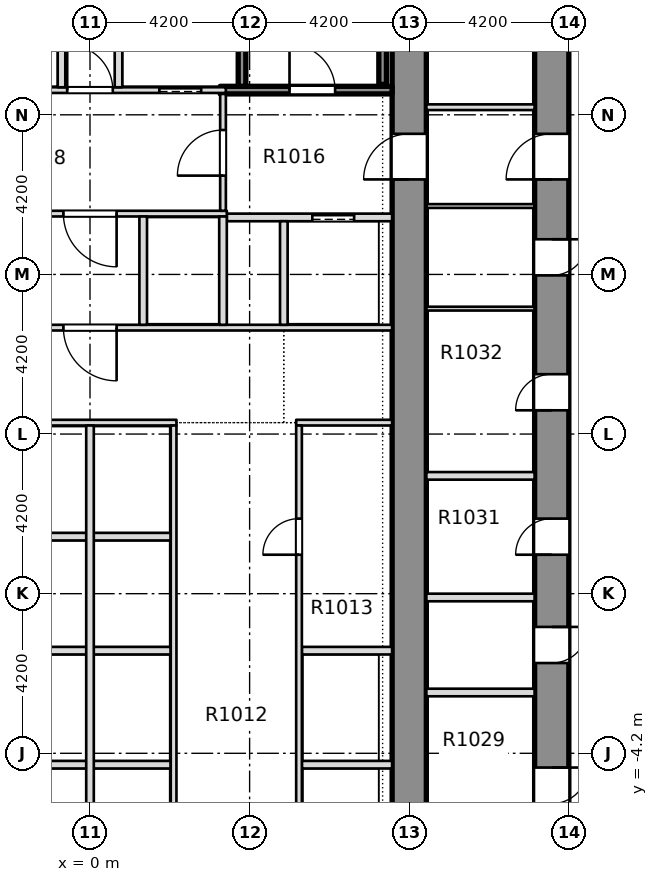
"""IFC4 building model, lengths in metres.
Left out: names, types, materials, properties, quantities, classifications, styles, units other than length and angle.
Written with IfcOpenShell. Run it as: python <this file> out.ifc"""

import sys

from ifc_helpers import new_model, si_unit, direction, frame, frame_2d, origin, place, context, subcontext, project, spatial, rectangle, extrude, element, fill, save


model = new_model("IFC4")
c1 = context("Model", 3, precision=1e-05, world=origin(), true_north=direction((0.0, 1.0)))
c2 = subcontext(c1, "Body", "Model", "MODEL_VIEW")
j1 = project(units=[si_unit("LENGTHUNIT", "METRE"), si_unit("PLANEANGLEUNIT", "RADIAN")], contexts=[c1])
p1 = place(None, origin())
s1 = spatial("IfcSite", under=j1, at=p1, CompositionType="ELEMENT")
p2 = place(p1, origin())
s2 = spatial("IfcBuilding", under=s1, at=p2, CompositionType="ELEMENT")
p3 = place(p2, frame((0.0, 0.0, 48.3)))
s3 = spatial("IfcBuildingStorey", under=s2, at=p3, CompositionType="ELEMENT", Elevation=48.3)
p4 = place(p3, frame((12.15, -8.4, -0.32), z_axis=(0.0, 0.0, 1.0), x_axis=(0.0, 1.0, 0.0)))
e1 = element("IfcWall", 1, at=p4, inside=s3, PredefinedType="SHEAR", context=c2, shape_type="SweptSolid", body=[
    extrude(rectangle(XDim=30.15, YDim=0.9, at=frame_2d((15.075, 0.0))), origin(), (0.0, 0.0, 1.0), 3.45),
])
p5 = place(p4, frame((2.875, 0.0, 0.32)))
e2 = element("IfcOpeningElement", 2, at=p5, cuts=e1, PredefinedType="OPENING", context=c2, shape_type="SweptSolid", body=[
    extrude(rectangle(XDim=0.95, YDim=2.1, at=frame_2d((0.475, 1.05))), frame((0.0, 0.46, 0.0), z_axis=(0.0, -1.0, 0.0), x_axis=(1.0, 0.0, 0.0)), (0.0, 0.0, 1.0), 0.92),
])
p6 = place(p4, frame((6.575, 0.0, 0.32)))
e3 = element("IfcOpeningElement", 3, at=p6, cuts=e1, PredefinedType="OPENING", context=c2, shape_type="SweptSolid", body=[
    extrude(rectangle(XDim=0.95, YDim=2.1, at=frame_2d((0.475, 1.05))), frame((0.0, 0.46, 0.0), z_axis=(0.0, -1.0, 0.0), x_axis=(1.0, 0.0, 0.0)), (0.0, 0.0, 1.0), 0.92),
])
p7 = place(p4, frame((9.425, 0.0, 0.32)))
e4 = element("IfcOpeningElement", 4, at=p7, cuts=e1, PredefinedType="OPENING", context=c2, shape_type="SweptSolid", body=[
    extrude(rectangle(XDim=0.95, YDim=2.1, at=frame_2d((0.475, 1.05))), frame((0.0, 0.46, 0.0), z_axis=(0.0, -1.0, 0.0), x_axis=(1.0, 0.0, 0.0)), (0.0, 0.0, 1.0), 0.92),
])
p8 = place(p4, frame((13.225, 0.0, 0.32)))
e5 = element("IfcOpeningElement", 5, at=p8, cuts=e1, PredefinedType="OPENING", context=c2, shape_type="SweptSolid", body=[
    extrude(rectangle(XDim=0.95, YDim=2.1, at=frame_2d((0.475, 1.05))), frame((0.0, 0.46, 0.0), z_axis=(0.0, -1.0, 0.0), x_axis=(1.0, 0.0, 0.0)), (0.0, 0.0, 1.0), 0.92),
])
p9 = place(p4, frame((16.775, 0.0, 0.32)))
e6 = element("IfcOpeningElement", 6, at=p9, cuts=e1, PredefinedType="OPENING", context=c2, shape_type="SweptSolid", body=[
    extrude(rectangle(XDim=0.95, YDim=2.1, at=frame_2d((0.475, 1.05))), frame((0.0, 0.46, 0.0), z_axis=(0.0, -1.0, 0.0), x_axis=(1.0, 0.0, 0.0)), (0.0, 0.0, 1.0), 0.92),
])
p10 = place(p4, frame((24.75, 0.0, 0.32)))
e7 = element("IfcOpeningElement", 7, at=p10, cuts=e1, PredefinedType="OPENING", context=c2, shape_type="SweptSolid", body=[
    extrude(rectangle(XDim=0.95, YDim=2.1, at=frame_2d((0.475, 1.05))), frame((0.0, 0.46, 0.0), z_axis=(0.0, -1.0, 0.0), x_axis=(1.0, 0.0, 0.0)), (0.0, 0.0, 1.0), 0.92),
])
p11 = place(p4, frame((19.3, 0.0, 0.32)))
e8 = element("IfcOpeningElement", 8, at=p11, cuts=e1, PredefinedType="OPENING", context=c2, shape_type="SweptSolid", body=[
    extrude(rectangle(XDim=1.2, YDim=2.1, at=frame_2d((0.6, 1.05))), frame((0.0, 0.46, 0.0), z_axis=(0.0, -1.0, 0.0), x_axis=(1.0, 0.0, 0.0)), (0.0, 0.0, 1.0), 0.92),
])
p12 = place(p3, frame((8.4, -7.5, -0.32), z_axis=(0.0, 0.0, 1.0), x_axis=(0.0, 1.0, 0.0)))
e9 = element("IfcWall", 9, at=p12, inside=s3, PredefinedType="SHEAR", context=c2, shape_type="SweptSolid", body=[
    extrude(rectangle(XDim=28.35, YDim=0.9, at=frame_2d((14.175, 0.0))), origin(), (0.0, 0.0, 1.0), 3.45),
])
p13 = place(p12, frame((18.4, 0.0, 0.32)))
e10 = element("IfcOpeningElement", 10, at=p13, cuts=e9, PredefinedType="OPENING", context=c2, shape_type="SweptSolid", body=[
    extrude(rectangle(XDim=1.2, YDim=2.1, at=frame_2d((0.6, 1.05))), frame((0.0, 0.46, 0.0), z_axis=(0.0, -1.0, 0.0), x_axis=(1.0, 0.0, 0.0)), (0.0, 0.0, 1.0), 0.92),
])
p14 = place(p3, frame((-2.125, -4.5, 0.0), z_axis=(0.0, 0.0, 1.0), x_axis=(1.0, 0.0, 0.0)))
e11 = element("IfcWall", 11, at=p14, inside=s3, PredefinedType="PARTITIONING", context=c2, shape_type="SweptSolid", body=[
    extrude(rectangle(XDim=4.25, YDim=0.2, at=frame_2d((2.125, 0.0))), origin(), (0.0, 0.0, 1.0), 3.13),
])
p15 = place(p3, frame((5.575, -4.5, 0.0), z_axis=(0.0, 0.0, 1.0), x_axis=(1.0, 0.0, 0.0)))
e12 = element("IfcWall", 12, at=p15, inside=s3, PredefinedType="PARTITIONING", context=c2, shape_type="SweptSolid", body=[
    extrude(rectangle(XDim=2.374, YDim=0.2, at=frame_2d((1.187, 0.0))), origin(), (0.0, 0.0, 1.0), 3.13),
])
p16 = place(p3, frame((-2.125, -1.5, 0.0), z_axis=(0.0, 0.0, 1.0), x_axis=(1.0, 0.0, 0.0)))
e13 = element("IfcWall", 13, at=p16, inside=s3, PredefinedType="PARTITIONING", context=c2, shape_type="SweptSolid", body=[
    extrude(rectangle(XDim=4.25, YDim=0.2, at=frame_2d((2.125, 0.0))), origin(), (0.0, 0.0, 1.0), 3.13),
])
p17 = place(p3, frame((5.575, -1.5, 0.0), z_axis=(0.0, 0.0, 1.0), x_axis=(1.0, 0.0, 0.0)))
e14 = element("IfcWall", 14, at=p17, inside=s3, PredefinedType="PARTITIONING", context=c2, shape_type="SweptSolid", body=[
    extrude(rectangle(XDim=2.374, YDim=0.2, at=frame_2d((1.187, 0.0))), origin(), (0.0, 0.0, 1.0), 3.13),
])
p18 = place(p3, frame((-2.125, 1.5, 0.0), z_axis=(0.0, 0.0, 1.0), x_axis=(1.0, 0.0, 0.0)))
e15 = element("IfcWall", 15, at=p18, inside=s3, PredefinedType="PARTITIONING", context=c2, shape_type="SweptSolid", body=[
    extrude(rectangle(XDim=4.25, YDim=0.2, at=frame_2d((2.125, 0.0))), origin(), (0.0, 0.0, 1.0), 3.13),
])
p19 = place(p3, frame((-2.275, 4.5, 0.0), z_axis=(0.0, 0.0, 1.0), x_axis=(1.0, 0.0, 0.0)))
e16 = element("IfcWall", 16, at=p19, inside=s3, PredefinedType="PARTITIONING", context=c2, shape_type="SweptSolid", body=[
    extrude(rectangle(XDim=4.55, YDim=0.15, at=frame_2d((2.275, 0.0))), origin(), (0.0, 0.0, 1.0), 3.13),
])
p20 = place(p3, frame((5.425, 4.5, 0.0), z_axis=(0.0, 0.0, 1.0), x_axis=(1.0, 0.0, 0.0)))
e17 = element("IfcWall", 17, at=p20, inside=s3, PredefinedType="PARTITIONING", context=c2, shape_type="SweptSolid", body=[
    extrude(rectangle(XDim=2.524, YDim=0.15, at=frame_2d((1.262, 0.0))), origin(), (0.0, 0.0, 1.0), 3.13),
])
p21 = place(p3, frame((-7.949, 7.0, 0.0), z_axis=(0.0, 0.0, 1.0), x_axis=(1.0, 0.0, 0.0)))
e18 = element("IfcWall", 18, at=p21, inside=s3, PredefinedType="PARTITIONING", context=c2, shape_type="SweptSolid", body=[
    extrude(rectangle(XDim=15.898, YDim=0.15, at=frame_2d((7.949, 0.0))), origin(), (0.0, 0.0, 1.0), 3.13),
])
p22 = place(p21, frame((7.249, 0.0, 0.0)))
e19 = element("IfcOpeningElement", 19, at=p22, cuts=e18, PredefinedType="OPENING", context=c2, shape_type="SweptSolid", body=[
    extrude(rectangle(XDim=1.4, YDim=2.1, at=frame_2d((0.7, 1.05))), frame((0.0, 0.085, 0.0), z_axis=(0.0, -1.0, 0.0), x_axis=(1.0, 0.0, 0.0)), (0.0, 0.0, 1.0), 0.17),
])
p23 = place(p3, frame((3.6, 9.9, 0.0), z_axis=(0.0, 0.0, 1.0), x_axis=(1.0, 0.0, 0.0)))
e20 = element("IfcWall", 20, at=p23, inside=s3, PredefinedType="PARTITIONING", context=c2, shape_type="SweptSolid", body=[
    extrude(rectangle(XDim=4.349, YDim=0.2, at=frame_2d((2.174, 0.0))), origin(), (0.0, 0.0, 1.0), 3.13),
])
p24 = place(p23, frame((2.25, 0.0, 0.0)))
e21 = element("IfcOpeningElement", 21, at=p24, cuts=e20, PredefinedType="OPENING", context=c2, shape_type="SweptSolid", body=[
    extrude(rectangle(XDim=1.1, YDim=2.1, at=frame_2d((0.55, 1.05))), frame((0.0, 0.11, 0.0), z_axis=(0.0, -1.0, 0.0), x_axis=(1.0, 0.0, 0.0)), (0.0, 0.0, 1.0), 0.22),
])
p25 = place(p3, frame((-3.6, 10.0, 0.0), z_axis=(0.0, 0.0, 1.0), x_axis=(1.0, 0.0, 0.0)))
e22 = element("IfcWall", 22, at=p25, inside=s3, PredefinedType="PARTITIONING", context=c2, shape_type="SweptSolid", body=[
    extrude(rectangle(XDim=7.2, YDim=0.15, at=frame_2d((3.6, 0.0))), origin(), (0.0, 0.0, 1.0), 3.13),
])
p26 = place(p25, frame((2.9, 0.0, 0.0)))
e23 = element("IfcOpeningElement", 23, at=p26, cuts=e22, PredefinedType="OPENING", context=c2, shape_type="SweptSolid", body=[
    extrude(rectangle(XDim=1.4, YDim=2.1, at=frame_2d((0.7, 1.05))), frame((0.0, 0.085, 0.0), z_axis=(0.0, -1.0, 0.0), x_axis=(1.0, 0.0, 0.0)), (0.0, 0.0, 1.0), 0.17),
])
p27 = place(p3, frame((-3.575, 13.25, 0.0), z_axis=(0.0, 0.0, 1.0), x_axis=(1.0, 0.0, 0.0)))
e24 = element("IfcWall", 24, at=p27, inside=s3, PredefinedType="PARTITIONING", context=c2, shape_type="SweptSolid", body=[
    extrude(rectangle(XDim=7.15, YDim=0.15, at=frame_2d((3.575, 0.0))), origin(), (0.0, 0.0, 1.0), 3.13),
])
p28 = place(p27, frame((0.6, 0.0, 0.0)))
e25 = element("IfcOpeningElement", 25, at=p28, cuts=e24, PredefinedType="OPENING", context=c2, shape_type="SweptSolid", body=[
    extrude(rectangle(XDim=1.2, YDim=2.1, at=frame_2d((0.6, 1.05))), frame((0.0, 0.085, 0.0), z_axis=(0.0, -1.0, 0.0), x_axis=(1.0, 0.0, 0.0)), (0.0, 0.0, 1.0), 0.17),
])
p29 = place(p27, frame((5.4, 0.0, 0.0)))
e26 = element("IfcOpeningElement", 26, at=p29, cuts=e24, PredefinedType="OPENING", context=c2, shape_type="SweptSolid", body=[
    extrude(rectangle(XDim=1.1, YDim=2.1, at=frame_2d((0.55, 1.05))), frame((0.0, 0.085, 0.0), z_axis=(0.0, -1.0, 0.0), x_axis=(1.0, 0.0, 0.0)), (0.0, 0.0, 1.0), 0.17),
])
p30 = place(p27, frame((2.975, 0.0, 0.0)))
e27 = element("IfcOpeningElement", 27, at=p30, cuts=e24, PredefinedType="OPENING", context=c2, shape_type="SweptSolid", body=[
    extrude(rectangle(XDim=1.2, YDim=2.1, at=frame_2d((0.6, 1.05))), frame((0.0, 0.085, 0.0), z_axis=(0.0, -1.0, 0.0), x_axis=(1.0, 0.0, 0.0)), (0.0, 0.0, 1.0), 0.17),
])
p31 = place(p3, frame((3.425, 13.25, 0.0), z_axis=(0.0, 0.0, 1.0), x_axis=(1.0, 0.0, 0.0)))
e28 = element("IfcWall", 28, at=p31, inside=s3, PredefinedType="SOLIDWALL", context=c2, shape_type="SweptSolid", body=[
    extrude(rectangle(XDim=4.524, YDim=0.2, at=frame_2d((2.262, 0.0))), origin(), (0.0, 0.0, 1.0), 3.13),
])
p32 = place(p31, frame((1.825, 0.0, 0.0)))
e29 = element("IfcOpeningElement", 29, at=p32, cuts=e28, PredefinedType="OPENING", context=c2, shape_type="SweptSolid", body=[
    extrude(rectangle(XDim=1.2, YDim=2.1, at=frame_2d((0.6, 1.05))), frame((0.0, 0.11, 0.0), z_axis=(0.0, -1.0, 0.0), x_axis=(1.0, 0.0, 0.0)), (0.0, 0.0, 1.0), 0.22),
])
p33 = place(p3, frame((-0.75, 13.325, 0.0), z_axis=(0.0, 0.0, 1.0), x_axis=(0.0, 1.0, 0.0)))
e30 = element("IfcWall", 30, at=p33, inside=s3, PredefinedType="PARTITIONING", context=c2, shape_type="SweptSolid", body=[
    extrude(rectangle(XDim=7.524, YDim=0.2, at=frame_2d((3.762, 0.0))), origin(), (0.0, 0.0, 1.0), 3.13),
])
p34 = place(p33, frame((4.8, 0.0, 0.0)))
e31 = element("IfcOpeningElement", 31, at=p34, cuts=e30, PredefinedType="OPENING", context=c2, shape_type="SweptSolid", body=[
    extrude(rectangle(XDim=0.95, YDim=2.1, at=frame_2d((0.475, 1.05))), frame((0.0, 0.11, 0.0), z_axis=(0.0, -1.0, 0.0), x_axis=(1.0, 0.0, 0.0)), (0.0, 0.0, 1.0), 0.22),
])
p35 = place(p3, frame((0.0, -7.499, 0.0), z_axis=(0.0, 0.0, 1.0), x_axis=(0.0, 1.0, 0.0)))
e32 = element("IfcWall", 32, at=p35, inside=s3, PredefinedType="PARTITIONING", context=c2, shape_type="SweptSolid", body=[
    extrude(rectangle(XDim=11.924, YDim=0.2, at=frame_2d((5.962, 0.0))), origin(), (0.0, 0.0, 1.0), 3.13),
])
p36 = place(p3, frame((0.75, 13.325, 0.0), z_axis=(0.0, 0.0, 1.0), x_axis=(0.0, 1.0, 0.0)))
e33 = element("IfcWall", 33, at=p36, inside=s3, PredefinedType="PARTITIONING", context=c2, shape_type="SweptSolid", body=[
    extrude(rectangle(XDim=2.625, YDim=0.2, at=frame_2d((1.312, 0.0))), origin(), (0.0, 0.0, 1.0), 3.13),
])
p37 = place(p3, frame((1.4, 7.075, 0.0), z_axis=(0.0, 0.0, 1.0), x_axis=(0.0, 1.0, 0.0)))
e34 = element("IfcWall", 34, at=p37, inside=s3, PredefinedType="PARTITIONING", context=c2, shape_type="SweptSolid", body=[
    extrude(rectangle(XDim=2.85, YDim=0.2, at=frame_2d((1.425, 0.0))), origin(), (0.0, 0.0, 1.0), 3.13),
])
p38 = place(p3, frame((2.2, -7.499, 0.0), z_axis=(0.0, 0.0, 1.0), x_axis=(0.0, 1.0, 0.0)))
e35 = element("IfcWall", 35, at=p38, inside=s3, PredefinedType="PARTITIONING", context=c2, shape_type="SweptSolid", body=[
    extrude(rectangle(XDim=11.924, YDim=0.15, at=frame_2d((5.962, 0.0))), origin(), (0.0, 0.0, 1.0), 3.13),
])
p39 = place(p3, frame((3.5, 7.075, 0.0), z_axis=(0.0, 0.0, 1.0), x_axis=(0.0, 1.0, 0.0)))
e36 = element("IfcWall", 36, at=p39, inside=s3, PredefinedType="PARTITIONING", context=c2, shape_type="SweptSolid", body=[
    extrude(rectangle(XDim=2.85, YDim=0.2, at=frame_2d((1.425, 0.0))), origin(), (0.0, 0.0, 1.0), 3.13),
])
p40 = place(p3, frame((3.5, 10.075, 0.0), z_axis=(0.0, 0.0, 1.0), x_axis=(0.0, 1.0, 0.0)))
e37 = element("IfcWall", 37, at=p40, inside=s3, PredefinedType="PARTITIONING", context=c2, shape_type="SweptSolid", body=[
    extrude(rectangle(XDim=3.075, YDim=0.15, at=frame_2d((1.538, 0.0))), origin(), (0.0, 0.0, 1.0), 3.13),
])
p41 = place(p40, frame((0.925, 0.0, 0.0)))
e38 = element("IfcOpeningElement", 38, at=p41, cuts=e37, PredefinedType="OPENING", context=c2, shape_type="SweptSolid", body=[
    extrude(rectangle(XDim=1.2, YDim=2.1, at=frame_2d((0.6, 1.05))), frame((0.0, 0.085, 0.0), z_axis=(0.0, -1.0, 0.0), x_axis=(1.0, 0.0, 0.0)), (0.0, 0.0, 1.0), 0.17),
])
p42 = place(p3, frame((4.0, 13.35, 0.0), z_axis=(0.0, 0.0, 1.0), x_axis=(0.0, 1.0, 0.0)))
e39 = element("IfcWall", 39, at=p42, inside=s3, PredefinedType="SOLIDWALL", context=c2, shape_type="SweptSolid", body=[
    extrude(rectangle(XDim=2.6, YDim=0.2, at=frame_2d((1.3, 0.0))), origin(), (0.0, 0.0, 1.0), 3.13),
])
p43 = place(p3, frame((5.1, 7.075, 0.0), z_axis=(0.0, 0.0, 1.0), x_axis=(0.0, 1.0, 0.0)))
e40 = element("IfcWall", 40, at=p43, inside=s3, PredefinedType="PARTITIONING", context=c2, shape_type="SweptSolid", body=[
    extrude(rectangle(XDim=2.725, YDim=0.2, at=frame_2d((1.363, 0.0))), origin(), (0.0, 0.0, 1.0), 3.13),
])
p44 = place(p3, frame((5.5, -7.499, 0.0), z_axis=(0.0, 0.0, 1.0), x_axis=(0.0, 1.0, 0.0)))
e41 = element("IfcWall", 41, at=p44, inside=s3, PredefinedType="PARTITIONING", context=c2, shape_type="SweptSolid", body=[
    extrude(rectangle(XDim=11.924, YDim=0.15, at=frame_2d((5.962, 0.0))), origin(), (0.0, 0.0, 1.0), 3.13),
])
p45 = place(p44, frame((8.524, 0.0, 0.0)))
e42 = element("IfcOpeningElement", 42, at=p45, cuts=e41, PredefinedType="OPENING", context=c2, shape_type="SweptSolid", body=[
    extrude(rectangle(XDim=0.95, YDim=2.1, at=frame_2d((0.475, 1.05))), frame((0.0, 0.085, 0.0), z_axis=(0.0, -1.0, 0.0), x_axis=(1.0, 0.0, 0.0)), (0.0, 0.0, 1.0), 0.17),
])
for number, where, z_axis, x_axis in (
    (43, (8.851, -2.6, 0.0), (0.0, 0.0, 1.0), (1.0, 0.0, 0.0)),
    (44, (8.851, -0.1, 0.0), (0.0, 0.0, 1.0), (1.0, 0.0, 0.0)),
    (45, (8.851, 3.1, 0.0), (0.0, 0.0, 1.0), (1.0, 0.0, 0.0)),
):
    element("IfcWall", number, at=place(p3, frame(where, z_axis=z_axis, x_axis=x_axis)), inside=s3, PredefinedType="PARTITIONING", context=c2, shape_type="SweptSolid", body=[
        extrude(rectangle(XDim=2.848, YDim=0.2, at=frame_2d((1.424, 0.0))), origin(), (0.0, 0.0, 1.0), 3.13),
    ])
for number, where, z_axis, x_axis in (
    (46, (8.851, 7.5, 0.0), (0.0, 0.0, 1.0), (1.0, 0.0, 0.0)),
    (47, (8.851, 10.2, 0.0), (0.0, 0.0, 1.0), (1.0, 0.0, 0.0)),
):
    element("IfcWall", number, at=place(p3, frame(where, z_axis=z_axis, x_axis=x_axis)), inside=s3, PredefinedType="PARTITIONING", context=c2, shape_type="SweptSolid", body=[
        extrude(rectangle(XDim=2.848, YDim=0.1, at=frame_2d((1.424, 0.0))), origin(), (0.0, 0.0, 1.0), 3.13),
    ])
p46 = place(p3, frame((8.851, 12.8, 0.0), z_axis=(0.0, 0.0, 1.0), x_axis=(1.0, 0.0, 0.0)))
e48 = element("IfcWall", 48, at=p46, inside=s3, PredefinedType="PARTITIONING", context=c2, shape_type="SweptSolid", body=[
    extrude(rectangle(XDim=2.848, YDim=0.15, at=frame_2d((1.424, 0.0))), origin(), (0.0, 0.0, 1.0), 3.13),
])
p47 = place(p3, frame((7.7, 13.4, 0.0), z_axis=(0.0, 0.0, 1.0), x_axis=(0.0, 1.0, 0.0)))
e49 = element("IfcWall", 49, at=p47, inside=s3, PredefinedType="SOLIDWALL", context=c2, shape_type="SweptSolid", body=[
    extrude(rectangle(XDim=7.4, YDim=0.2, at=frame_2d((3.7, 0.0))), origin(), (0.0, 0.0, 1.0), 3.13),
])
p48 = place(p45, origin())
e50 = element("IfcDoor", 50, at=p48, inside=s3, OperationType="SINGLE_SWING_LEFT", PredefinedType="DOOR", context=c2, shape_type="SweptSolid", body=[
    extrude(rectangle(XDim=0.95, YDim=2.1, at=frame_2d((0.475, 1.05))), frame((0.0, 0.025, 0.0), z_axis=(0.0, -1.0, 0.0), x_axis=(1.0, 0.0, 0.0)), (0.0, 0.0, 1.0), 0.05),
])
fill(e42, e50)
p49 = place(p32, origin())
e51 = element("IfcDoor", 51, at=p49, inside=s3, OperationType="SINGLE_SWING_RIGHT", PredefinedType="DOOR", context=c2, shape_type="SweptSolid", body=[
    extrude(rectangle(XDim=1.2, YDim=2.1, at=frame_2d((0.6, 1.05))), frame((0.0, 0.025, 0.0), z_axis=(0.0, -1.0, 0.0), x_axis=(1.0, 0.0, 0.0)), (0.0, 0.0, 1.0), 0.05),
])
fill(e29, e51)
p50 = place(p24, origin())
e52 = element("IfcDoor", 52, at=p50, inside=s3, OperationType="SLIDING_TO_LEFT", PredefinedType="DOOR", context=c2, shape_type="SweptSolid", body=[
    extrude(rectangle(XDim=1.1, YDim=2.1, at=frame_2d((0.55, 1.05))), frame((0.0, 0.025, 0.0), z_axis=(0.0, -1.0, 0.0), x_axis=(1.0, 0.0, 0.0)), (0.0, 0.0, 1.0), 0.05),
])
fill(e21, e52)
p51 = place(p22, origin())
e53 = element("IfcDoor", 53, at=p51, inside=s3, OperationType="SINGLE_SWING_RIGHT", PredefinedType="DOOR", context=c2, shape_type="SweptSolid", body=[
    extrude(rectangle(XDim=1.4, YDim=2.1, at=frame_2d((0.7, 1.05))), frame((0.0, 0.025, 0.0), z_axis=(0.0, -1.0, 0.0), x_axis=(1.0, 0.0, 0.0)), (0.0, 0.0, 1.0), 0.05),
])
fill(e19, e53)
p52 = place(p26, origin())
e54 = element("IfcDoor", 54, at=p52, inside=s3, OperationType="SINGLE_SWING_RIGHT", PredefinedType="DOOR", context=c2, shape_type="SweptSolid", body=[
    extrude(rectangle(XDim=1.4, YDim=2.1, at=frame_2d((0.7, 1.05))), frame((0.0, 0.025, 0.0), z_axis=(0.0, -1.0, 0.0), x_axis=(1.0, 0.0, 0.0)), (0.0, 0.0, 1.0), 0.05),
])
fill(e23, e54)
p53 = place(p29, origin())
e55 = element("IfcDoor", 55, at=p53, inside=s3, OperationType="SLIDING_TO_LEFT", PredefinedType="DOOR", context=c2, shape_type="SweptSolid", body=[
    extrude(rectangle(XDim=1.1, YDim=2.1, at=frame_2d((0.55, 1.05))), frame((0.0, 0.025, 0.0), z_axis=(0.0, -1.0, 0.0), x_axis=(1.0, 0.0, 0.0)), (0.0, 0.0, 1.0), 0.05),
])
fill(e26, e55)
p54 = place(p30, origin())
e56 = element("IfcDoor", 56, at=p54, inside=s3, OperationType="SINGLE_SWING_RIGHT", PredefinedType="DOOR", context=c2, shape_type="SweptSolid", body=[
    extrude(rectangle(XDim=1.2, YDim=2.1, at=frame_2d((0.6, 1.05))), frame((0.0, 0.025, 0.0), z_axis=(0.0, -1.0, 0.0), x_axis=(1.0, 0.0, 0.0)), (0.0, 0.0, 1.0), 0.05),
])
fill(e27, e56)
p55 = place(p41, origin())
e57 = element("IfcDoor", 57, at=p55, inside=s3, OperationType="SINGLE_SWING_LEFT", PredefinedType="DOOR", context=c2, shape_type="SweptSolid", body=[
    extrude(rectangle(XDim=1.2, YDim=2.1, at=frame_2d((0.6, 1.05))), frame((0.0, 0.025, 0.0), z_axis=(0.0, -1.0, 0.0), x_axis=(1.0, 0.0, 0.0)), (0.0, 0.0, 1.0), 0.05),
])
fill(e38, e57)
p56 = place(p5, origin())
e58 = element("IfcDoor", 58, at=p56, inside=s3, OperationType="SINGLE_SWING_LEFT", PredefinedType="DOOR", context=c2, shape_type="SweptSolid", body=[
    extrude(rectangle(XDim=0.95, YDim=2.1, at=frame_2d((0.475, 1.05))), frame((0.0, 0.025, 0.0), z_axis=(0.0, -1.0, 0.0), x_axis=(1.0, 0.0, 0.0)), (0.0, 0.0, 1.0), 0.05),
])
fill(e2, e58)
p57 = place(p6, origin())
e59 = element("IfcDoor", 59, at=p57, inside=s3, OperationType="SINGLE_SWING_LEFT", PredefinedType="DOOR", context=c2, shape_type="SweptSolid", body=[
    extrude(rectangle(XDim=0.95, YDim=2.1, at=frame_2d((0.475, 1.05))), frame((0.0, 0.025, 0.0), z_axis=(0.0, -1.0, 0.0), x_axis=(1.0, 0.0, 0.0)), (0.0, 0.0, 1.0), 0.05),
])
fill(e3, e59)
p58 = place(p7, origin())
e60 = element("IfcDoor", 60, at=p58, inside=s3, OperationType="SINGLE_SWING_LEFT", PredefinedType="DOOR", context=c2, shape_type="SweptSolid", body=[
    extrude(rectangle(XDim=0.95, YDim=2.1, at=frame_2d((0.475, 1.05))), frame((0.0, 0.025, 0.0), z_axis=(0.0, -1.0, 0.0), x_axis=(1.0, 0.0, 0.0)), (0.0, 0.0, 1.0), 0.05),
])
fill(e4, e60)
p59 = place(p8, origin())
e61 = element("IfcDoor", 61, at=p59, inside=s3, OperationType="SINGLE_SWING_LEFT", PredefinedType="DOOR", context=c2, shape_type="SweptSolid", body=[
    extrude(rectangle(XDim=0.95, YDim=2.1, at=frame_2d((0.475, 1.05))), frame((0.0, 0.025, 0.0), z_axis=(0.0, -1.0, 0.0), x_axis=(1.0, 0.0, 0.0)), (0.0, 0.0, 1.0), 0.05),
])
fill(e5, e61)
p60 = place(p9, origin())
e62 = element("IfcDoor", 62, at=p60, inside=s3, OperationType="SINGLE_SWING_LEFT", PredefinedType="DOOR", context=c2, shape_type="SweptSolid", body=[
    extrude(rectangle(XDim=0.95, YDim=2.1, at=frame_2d((0.475, 1.05))), frame((0.0, 0.025, 0.0), z_axis=(0.0, -1.0, 0.0), x_axis=(1.0, 0.0, 0.0)), (0.0, 0.0, 1.0), 0.05),
])
fill(e6, e62)
p61 = place(p11, origin())
e63 = element("IfcDoor", 63, at=p61, inside=s3, OperationType="SINGLE_SWING_LEFT", PredefinedType="DOOR", context=c2, shape_type="SweptSolid", body=[
    extrude(rectangle(XDim=1.2, YDim=2.1, at=frame_2d((0.6, 1.05))), frame((0.0, 0.025, 0.0), z_axis=(0.0, -1.0, 0.0), x_axis=(1.0, 0.0, 0.0)), (0.0, 0.0, 1.0), 0.05),
])
fill(e8, e63)
p62 = place(p13, origin())
e64 = element("IfcDoor", 64, at=p62, inside=s3, OperationType="SINGLE_SWING_LEFT", PredefinedType="DOOR", context=c2, shape_type="SweptSolid", body=[
    extrude(rectangle(XDim=1.2, YDim=2.1, at=frame_2d((0.6, 1.05))), frame((0.0, 0.025, 0.0), z_axis=(0.0, -1.0, 0.0), x_axis=(1.0, 0.0, 0.0)), (0.0, 0.0, 1.0), 0.05),
])
fill(e10, e64)
save(model, sys.argv[1])
